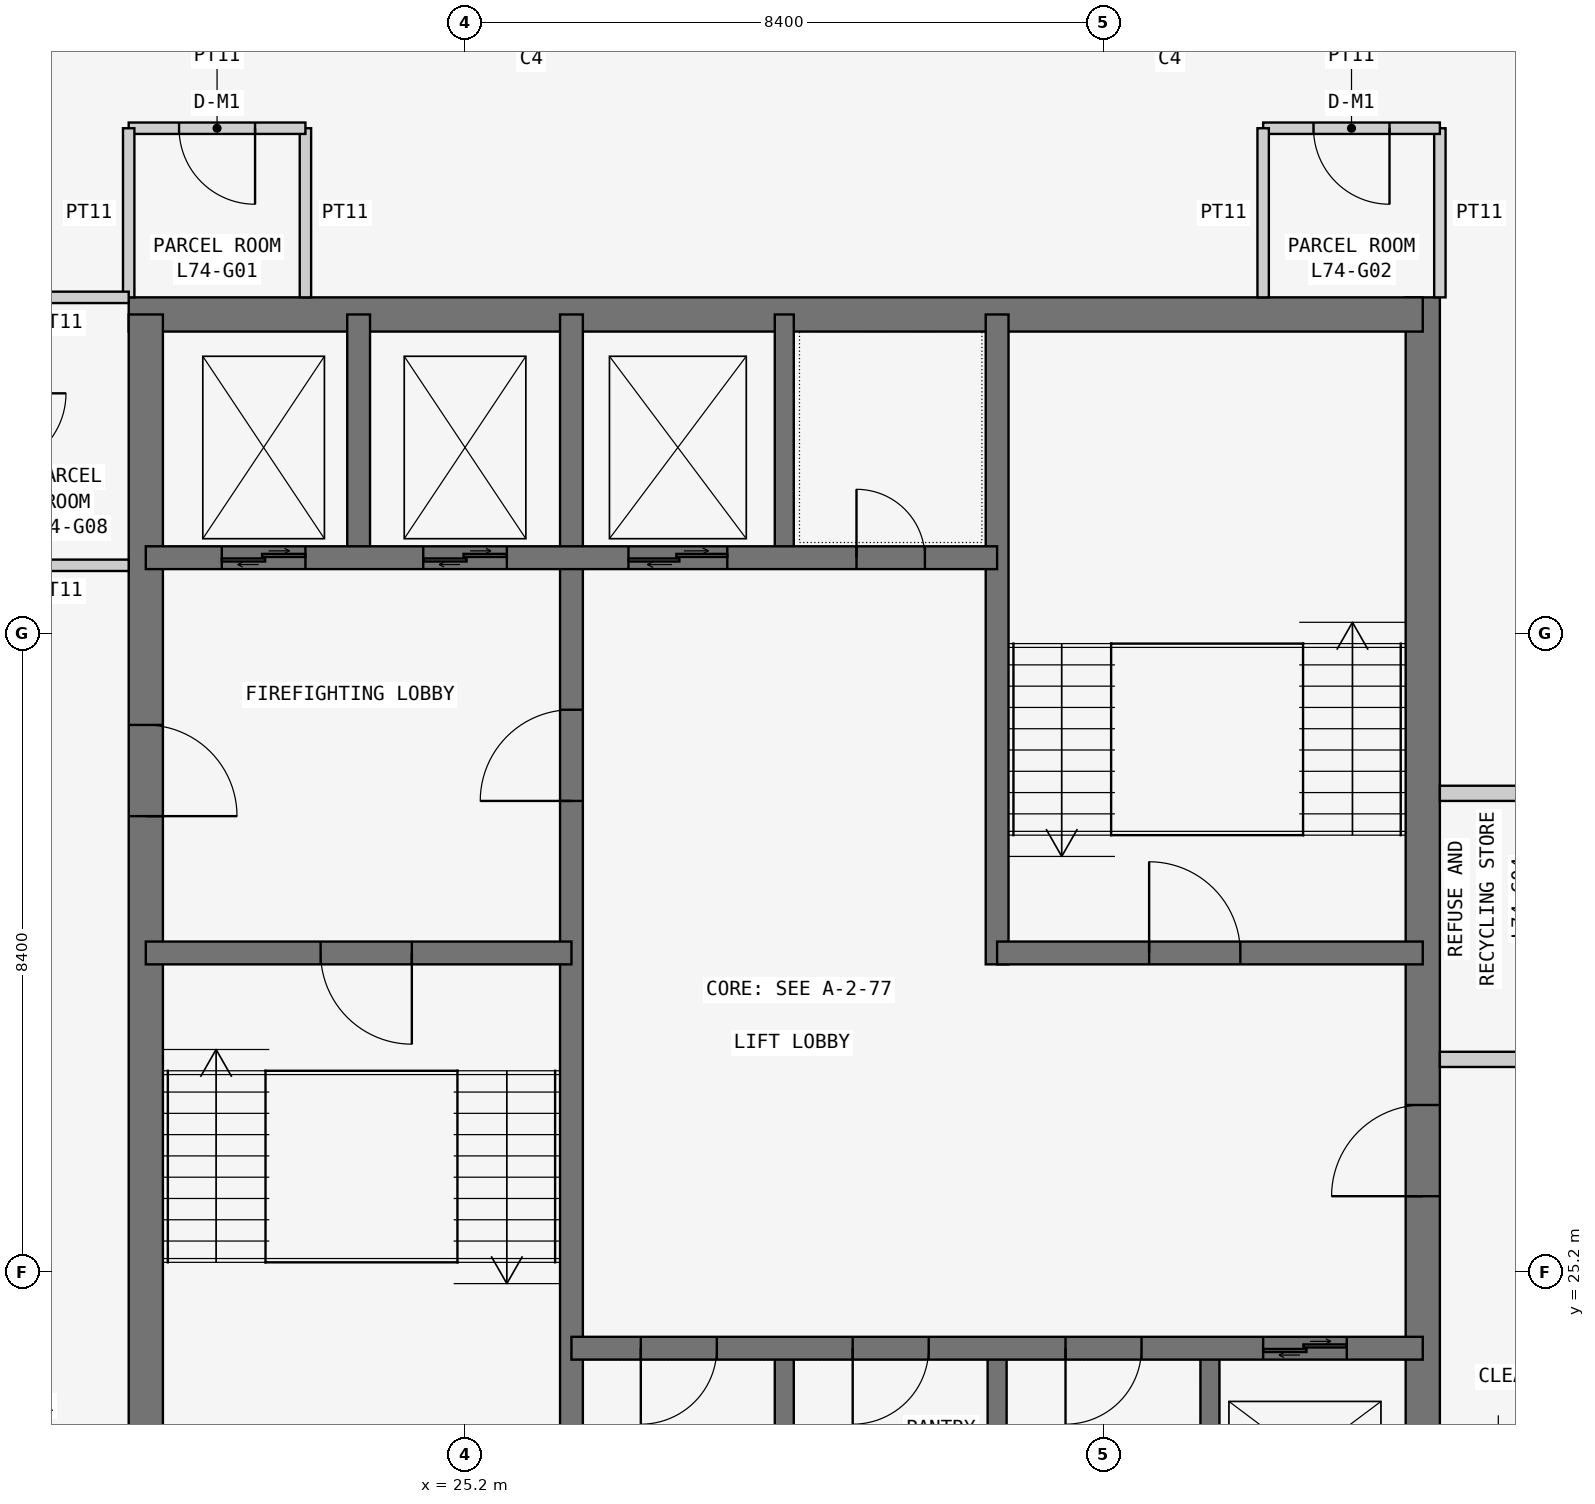
"""IFC4 building model, lengths in metres.
Left out: names, types, materials, properties, quantities, classifications, styles, units other than length and angle.
Written with IfcOpenShell. Run it as: python <this file> out.ifc"""

import sys

from ifc_helpers import new_model, si_unit, direction, frame, frame_2d, origin, place, context, subcontext, project, spatial, rectangle, extrude, element, fill, save


model = new_model("IFC4")
c1 = context("Model", 3, precision=1e-05, world=origin(), true_north=direction((0.0, 1.0)))
c2 = subcontext(c1, "Body", "Model", "MODEL_VIEW")
j1 = project(units=[si_unit("LENGTHUNIT", "METRE"), si_unit("PLANEANGLEUNIT", "RADIAN")], contexts=[c1])
p1 = place(None, origin())
s1 = spatial("IfcSite", under=j1, at=p1, CompositionType="ELEMENT")
p2 = place(p1, origin())
s2 = spatial("IfcBuilding", under=s1, at=p2, CompositionType="ELEMENT")
p3 = place(p2, frame((0.0, 0.0, 282.9)))
s3 = spatial("IfcBuildingStorey", under=s2, at=p3, CompositionType="ELEMENT", Elevation=282.9)
p4 = place(p3, frame((37.8, 21.0, 0.0), z_axis=(0.0, 0.0, 1.0), x_axis=(0.0, 1.0, 0.0)))
e1 = element("IfcWall", 1, at=p4, inside=s3, PredefinedType="SHEAR", context=c2, shape_type="SweptSolid", body=[
    extrude(rectangle(XDim=17.025, YDim=0.45, at=frame_2d((8.512, 0.0))), origin(), (0.0, 0.0, 1.0), 3.6),
])
p5 = place(p4, frame((5.2, 0.0, 0.0)))
e2 = element("IfcOpeningElement", 2, at=p5, cuts=e1, PredefinedType="OPENING", context=c2, shape_type="SweptSolid", body=[
    extrude(rectangle(XDim=1.2, YDim=2.1, at=frame_2d((0.6, 1.05))), frame((0.0, 0.235, 0.0), z_axis=(0.0, -1.0, 0.0), x_axis=(1.0, 0.0, 0.0)), (0.0, 0.0, 1.0), 0.47),
])
p6 = place(p3, frame((37.8, 37.8, 0.0), z_axis=(0.0, 0.0, 1.0), x_axis=(-1.0, 0.0, 0.0)))
e3 = element("IfcWall", 3, at=p6, inside=s3, PredefinedType="SHEAR", context=c2, shape_type="SweptSolid", body=[
    extrude(rectangle(XDim=17.025, YDim=0.45, at=frame_2d((8.513, 0.0))), origin(), (0.0, 0.0, 1.0), 3.6),
])
p7 = place(p3, frame((21.0, 37.8, 0.0), z_axis=(0.0, 0.0, 1.0), x_axis=(0.0, -1.0, 0.0)))
e4 = element("IfcWall", 4, at=p7, inside=s3, PredefinedType="SHEAR", context=c2, shape_type="SweptSolid", body=[
    extrude(rectangle(XDim=17.025, YDim=0.45, at=frame_2d((8.513, 0.0))), origin(), (0.0, 0.0, 1.0), 3.6),
])
p8 = place(p7, frame((5.4, 0.0, 0.0)))
e5 = element("IfcOpeningElement", 5, at=p8, cuts=e4, PredefinedType="OPENING", context=c2, shape_type="SweptSolid", body=[
    extrude(rectangle(XDim=1.2, YDim=2.1, at=frame_2d((0.6, 1.05))), frame((0.0, 0.235, 0.0), z_axis=(0.0, -1.0, 0.0), x_axis=(1.0, 0.0, 0.0)), (0.0, 0.0, 1.0), 0.47),
])
p9 = place(p3, frame((26.6, 21.0, 0.0), z_axis=(0.0, 0.0, 1.0), x_axis=(0.0, 1.0, 0.0)))
e6 = element("IfcWall", 6, at=p9, inside=s3, PredefinedType="SHEAR", context=c2, shape_type="SweptSolid", body=[
    extrude(rectangle(XDim=16.8, YDim=0.3, at=frame_2d((8.4, 0.0))), origin(), (0.0, 0.0, 1.0), 3.6),
])
p10 = place(p9, frame((10.4, 0.0, 0.0)))
e7 = element("IfcOpeningElement", 7, at=p10, cuts=e6, PredefinedType="OPENING", context=c2, shape_type="SweptSolid", body=[
    extrude(rectangle(XDim=1.2, YDim=2.1, at=frame_2d((0.6, 1.05))), frame((0.0, 0.16, 0.0), z_axis=(0.0, -1.0, 0.0), x_axis=(1.0, 0.0, 0.0)), (0.0, 0.0, 1.0), 0.32),
])
p11 = place(p3, frame((21.0, 29.4, 0.0), z_axis=(0.0, 0.0, 1.0), x_axis=(1.0, 0.0, 0.0)))
e8 = element("IfcWall", 8, at=p11, inside=s3, PredefinedType="SHEAR", context=c2, shape_type="SweptSolid", body=[
    extrude(rectangle(XDim=5.6, YDim=0.3, at=frame_2d((2.8, 0.0))), origin(), (0.0, 0.0, 1.0), 3.6),
])
p12 = place(p11, frame((2.3, 0.0, 0.0)))
e9 = element("IfcOpeningElement", 9, at=p12, cuts=e8, PredefinedType="OPENING", context=c2, shape_type="SweptSolid", body=[
    extrude(rectangle(XDim=1.2, YDim=2.1, at=frame_2d((0.6, 1.05))), frame((0.0, 0.16, 0.0), z_axis=(0.0, -1.0, 0.0), x_axis=(1.0, 0.0, 0.0)), (0.0, 0.0, 1.0), 0.32),
])
p13 = place(p3, frame((21.0, 34.6, 0.0), z_axis=(0.0, 0.0, 1.0), x_axis=(1.0, 0.0, 0.0)))
e10 = element("IfcWall", 10, at=p13, inside=s3, PredefinedType="SHEAR", context=c2, shape_type="SweptSolid", body=[
    extrude(rectangle(XDim=11.2, YDim=0.3, at=frame_2d((5.6, 0.0))), origin(), (0.0, 0.0, 1.0), 3.6),
])
p14 = place(p13, frame((9.35, 0.0, 0.0)))
e11 = element("IfcOpeningElement", 11, at=p14, cuts=e10, PredefinedType="OPENING", context=c2, shape_type="SweptSolid", body=[
    extrude(rectangle(XDim=0.9, YDim=2.1, at=frame_2d((0.45, 1.05))), frame((0.0, 0.16, 0.0), z_axis=(0.0, -1.0, 0.0), x_axis=(1.0, 0.0, 0.0)), (0.0, 0.0, 1.0), 0.32),
])
p15 = place(p13, frame((1.0, 0.0, 0.0)))
e12 = element("IfcOpeningElement", 12, at=p15, cuts=e10, PredefinedType="OPENING", context=c2, shape_type="SweptSolid", body=[
    extrude(rectangle(XDim=1.1, YDim=2.1, at=frame_2d((0.55, 1.05))), frame((0.0, 0.16, 0.0), z_axis=(0.0, -1.0, 0.0), x_axis=(1.0, 0.0, 0.0)), (0.0, 0.0, 1.0), 0.32),
])
p16 = place(p13, frame((3.65, 0.0, 0.0)))
e13 = element("IfcOpeningElement", 13, at=p16, cuts=e10, PredefinedType="OPENING", context=c2, shape_type="SweptSolid", body=[
    extrude(rectangle(XDim=1.1, YDim=2.1, at=frame_2d((0.55, 1.05))), frame((0.0, 0.16, 0.0), z_axis=(0.0, -1.0, 0.0), x_axis=(1.0, 0.0, 0.0)), (0.0, 0.0, 1.0), 0.32),
])
p17 = place(p13, frame((6.35, 0.0, 0.0)))
e14 = element("IfcOpeningElement", 14, at=p17, cuts=e10, PredefinedType="OPENING", context=c2, shape_type="SweptSolid", body=[
    extrude(rectangle(XDim=1.3, YDim=2.1, at=frame_2d((0.65, 1.05))), frame((0.0, 0.16, 0.0), z_axis=(0.0, -1.0, 0.0), x_axis=(1.0, 0.0, 0.0)), (0.0, 0.0, 1.0), 0.32),
])
p18 = place(p3, frame((23.8, 34.6, 0.0), z_axis=(0.0, 0.0, 1.0), x_axis=(0.0, 1.0, 0.0)))
e15 = element("IfcWall", 15, at=p18, inside=s3, PredefinedType="SHEAR", context=c2, shape_type="SweptSolid", body=[
    extrude(rectangle(XDim=3.2, YDim=0.3, at=frame_2d((1.6, 0.0))), origin(), (0.0, 0.0, 1.0), 3.6),
])
p19 = place(p3, frame((26.6, 24.2, 0.0), z_axis=(0.0, 0.0, 1.0), x_axis=(1.0, 0.0, 0.0)))
e16 = element("IfcWall", 16, at=p19, inside=s3, PredefinedType="SHEAR", context=c2, shape_type="SweptSolid", body=[
    extrude(rectangle(XDim=11.2, YDim=0.3, at=frame_2d((5.6, 0.0))), origin(), (0.0, 0.0, 1.0), 3.6),
])
p20 = place(p19, frame((0.913, 0.0, 0.0)))
e17 = element("IfcOpeningElement", 17, at=p20, cuts=e16, PredefinedType="OPENING", context=c2, shape_type="SweptSolid", body=[
    extrude(rectangle(XDim=1.0, YDim=2.1, at=frame_2d((0.5, 1.05))), frame((0.0, 0.16, 0.0), z_axis=(0.0, -1.0, 0.0), x_axis=(1.0, 0.0, 0.0)), (0.0, 0.0, 1.0), 0.32),
])
p21 = place(p19, frame((3.7, 0.0, 0.0)))
e18 = element("IfcOpeningElement", 18, at=p21, cuts=e16, PredefinedType="OPENING", context=c2, shape_type="SweptSolid", body=[
    extrude(rectangle(XDim=1.0, YDim=2.1, at=frame_2d((0.5, 1.05))), frame((0.0, 0.16, 0.0), z_axis=(0.0, -1.0, 0.0), x_axis=(1.0, 0.0, 0.0)), (0.0, 0.0, 1.0), 0.32),
])
p22 = place(p19, frame((6.5, 0.0, 0.0)))
e19 = element("IfcOpeningElement", 19, at=p22, cuts=e16, PredefinedType="OPENING", context=c2, shape_type="SweptSolid", body=[
    extrude(rectangle(XDim=1.0, YDim=2.1, at=frame_2d((0.5, 1.05))), frame((0.0, 0.16, 0.0), z_axis=(0.0, -1.0, 0.0), x_axis=(1.0, 0.0, 0.0)), (0.0, 0.0, 1.0), 0.32),
])
p23 = place(p19, frame((9.1, 0.0, 0.0)))
e20 = element("IfcOpeningElement", 20, at=p23, cuts=e16, PredefinedType="OPENING", context=c2, shape_type="SweptSolid", body=[
    extrude(rectangle(XDim=1.1, YDim=2.1, at=frame_2d((0.55, 1.05))), frame((0.0, 0.16, 0.0), z_axis=(0.0, -1.0, 0.0), x_axis=(1.0, 0.0, 0.0)), (0.0, 0.0, 1.0), 0.32),
])
p24 = place(p3, frame((32.2, 29.25, 0.0), z_axis=(0.0, 0.0, 1.0), x_axis=(0.0, 1.0, 0.0)))
e21 = element("IfcWall", 21, at=p24, inside=s3, PredefinedType="SHEAR", context=c2, shape_type="SweptSolid", body=[
    extrude(rectangle(XDim=8.55, YDim=0.3, at=frame_2d((4.275, 0.0))), origin(), (0.0, 0.0, 1.0), 3.6),
])
p25 = place(p3, frame((32.2, 29.4, 0.0), z_axis=(0.0, 0.0, 1.0), x_axis=(1.0, 0.0, 0.0)))
e22 = element("IfcWall", 22, at=p25, inside=s3, PredefinedType="SHEAR", context=c2, shape_type="SweptSolid", body=[
    extrude(rectangle(XDim=5.6, YDim=0.3, at=frame_2d((2.8, 0.0))), origin(), (0.0, 0.0, 1.0), 3.6),
])
p26 = place(p25, frame((2.0, 0.0, 0.0)))
e23 = element("IfcOpeningElement", 23, at=p26, cuts=e22, PredefinedType="OPENING", context=c2, shape_type="SweptSolid", body=[
    extrude(rectangle(XDim=1.2, YDim=2.1, at=frame_2d((0.6, 1.05))), frame((0.0, 0.16, 0.0), z_axis=(0.0, -1.0, 0.0), x_axis=(1.0, 0.0, 0.0)), (0.0, 0.0, 1.0), 0.32),
])
for number, where, z_axis, x_axis in (
    (24, (29.4, 21.0, 0.0), (0.0, 0.0, 1.0), (0.0, 1.0, 0.0)),
    (25, (32.2, 21.0, 0.0), (0.0, 0.0, 1.0), (0.0, 1.0, 0.0)),
    (26, (35.0, 21.0, 0.0), (0.0, 0.0, 1.0), (0.0, 1.0, 0.0)),
    (27, (29.4, 34.6, 0.0), (0.0, 0.0, 1.0), (0.0, 1.0, 0.0)),
):
    element("IfcWall", number, at=place(p3, frame(where, z_axis=z_axis, x_axis=x_axis)), inside=s3, PredefinedType="SHEAR", context=c2, shape_type="SweptSolid", body=[
        extrude(rectangle(XDim=3.2, YDim=0.25, at=frame_2d((1.6, 0.0))), origin(), (0.0, 0.0, 1.0), 3.6),
    ])
p27 = place(p3, frame((23.1, 38.025, 0.0), z_axis=(0.0, 0.0, 1.0), x_axis=(0.0, 1.0, 0.0)))
e28 = element("IfcWall", 28, at=p27, inside=s3, PredefinedType="PARTITIONING", context=c2, shape_type="SweptSolid", body=[
    extrude(rectangle(XDim=2.225, YDim=0.15, at=frame_2d((1.113, 0.0))), origin(), (0.0, 0.0, 1.0), 3.45),
])
p28 = place(p3, frame((23.1, 40.25, 0.0), z_axis=(0.0, 0.0, 1.0), x_axis=(-1.0, 0.0, 0.0)))
e29 = element("IfcWall", 29, at=p28, inside=s3, PredefinedType="PARTITIONING", context=c2, shape_type="SweptSolid", body=[
    extrude(rectangle(XDim=2.325, YDim=0.15, at=frame_2d((1.163, 0.0))), origin(), (0.0, 0.0, 1.0), 3.45),
])
p29 = place(p28, frame((0.663, 0.0, 0.0)))
e30 = element("IfcOpeningElement", 30, at=p29, cuts=e29, PredefinedType="OPENING", context=c2, shape_type="SweptSolid", body=[
    extrude(rectangle(XDim=1.0, YDim=2.1, at=frame_2d((0.5, 1.05))), frame((0.0, 0.085, 0.0), z_axis=(0.0, -1.0, 0.0), x_axis=(1.0, 0.0, 0.0)), (0.0, 0.0, 1.0), 0.17),
])
for number, where, z_axis, x_axis in (
    (31, (20.775, 40.25, 0.0), (0.0, 0.0, 1.0), (0.0, -1.0, 0.0)),
    (32, (38.025, 38.025, 0.0), (0.0, 0.0, 1.0), (0.0, 1.0, 0.0)),
):
    element("IfcWall", number, at=place(p3, frame(where, z_axis=z_axis, x_axis=x_axis)), inside=s3, PredefinedType="PARTITIONING", context=c2, shape_type="SweptSolid", body=[
        extrude(rectangle(XDim=2.225, YDim=0.15, at=frame_2d((1.113, 0.0))), origin(), (0.0, 0.0, 1.0), 3.45),
    ])
p30 = place(p3, frame((38.025, 40.25, 0.0), z_axis=(0.0, 0.0, 1.0), x_axis=(-1.0, 0.0, 0.0)))
e33 = element("IfcWall", 33, at=p30, inside=s3, PredefinedType="PARTITIONING", context=c2, shape_type="SweptSolid", body=[
    extrude(rectangle(XDim=2.325, YDim=0.15, at=frame_2d((1.163, 0.0))), origin(), (0.0, 0.0, 1.0), 3.45),
])
p31 = place(p30, frame((0.663, 0.0, 0.0)))
e34 = element("IfcOpeningElement", 34, at=p31, cuts=e33, PredefinedType="OPENING", context=c2, shape_type="SweptSolid", body=[
    extrude(rectangle(XDim=1.0, YDim=2.1, at=frame_2d((0.5, 1.05))), frame((0.0, 0.085, 0.0), z_axis=(0.0, -1.0, 0.0), x_axis=(1.0, 0.0, 0.0)), (0.0, 0.0, 1.0), 0.17),
])
p32 = place(p3, frame((35.7, 40.25, 0.0), z_axis=(0.0, 0.0, 1.0), x_axis=(0.0, -1.0, 0.0)))
e35 = element("IfcWall", 35, at=p32, inside=s3, PredefinedType="PARTITIONING", context=c2, shape_type="SweptSolid", body=[
    extrude(rectangle(XDim=2.225, YDim=0.15, at=frame_2d((1.113, 0.0))), origin(), (0.0, 0.0, 1.0), 3.45),
])
for number, where, z_axis, x_axis in (
    (36, (38.025, 28.0, 0.0), (0.0, 0.0, 1.0), (1.0, 0.0, 0.0)),
    (37, (40.6, 31.5, 0.0), (0.0, 0.0, 1.0), (-1.0, 0.0, 0.0)),
):
    element("IfcWall", number, at=place(p3, frame(where, z_axis=z_axis, x_axis=x_axis)), inside=s3, PredefinedType="PARTITIONING", context=c2, shape_type="SweptSolid", body=[
        extrude(rectangle(XDim=2.575, YDim=0.2, at=frame_2d((1.288, 0.0))), origin(), (0.0, 0.0, 1.0), 3.45),
    ])
for number, where, z_axis, x_axis in (
    (38, (20.775, 38.025, 0.0), (0.0, 0.0, 1.0), (-1.0, 0.0, 0.0)),
    (39, (18.95, 34.5, 0.0), (0.0, 0.0, 1.0), (1.0, 0.0, 0.0)),
):
    element("IfcWall", number, at=place(p3, frame(where, z_axis=z_axis, x_axis=x_axis)), inside=s3, PredefinedType="PARTITIONING", context=c2, shape_type="SweptSolid", body=[
        extrude(rectangle(XDim=1.825, YDim=0.15, at=frame_2d((0.913, 0.0))), origin(), (0.0, 0.0, 1.0), 3.45),
    ])
p33 = place(p29, origin())
e40 = element("IfcDoor", 40, at=p33, inside=s3, OperationType="SINGLE_SWING_LEFT", PredefinedType="DOOR", context=c2, shape_type="SweptSolid", body=[
    extrude(rectangle(XDim=1.0, YDim=2.1, at=frame_2d((0.5, 1.05))), frame((0.0, 0.025, 0.0), z_axis=(0.0, -1.0, 0.0), x_axis=(1.0, 0.0, 0.0)), (0.0, 0.0, 1.0), 0.05),
])
fill(e30, e40)
p34 = place(p31, origin())
e41 = element("IfcDoor", 41, at=p34, inside=s3, OperationType="SINGLE_SWING_LEFT", PredefinedType="DOOR", context=c2, shape_type="SweptSolid", body=[
    extrude(rectangle(XDim=1.0, YDim=2.1, at=frame_2d((0.5, 1.05))), frame((0.0, 0.025, 0.0), z_axis=(0.0, -1.0, 0.0), x_axis=(1.0, 0.0, 0.0)), (0.0, 0.0, 1.0), 0.05),
])
fill(e34, e41)
p35 = place(p8, origin())
e42 = element("IfcDoor", 42, at=p35, inside=s3, OperationType="SINGLE_SWING_RIGHT", PredefinedType="DOOR", context=c2, shape_type="SweptSolid", body=[
    extrude(rectangle(XDim=1.2, YDim=2.1, at=frame_2d((0.6, 1.05))), frame((0.0, 0.025, 0.0), z_axis=(0.0, -1.0, 0.0), x_axis=(1.0, 0.0, 0.0)), (0.0, 0.0, 1.0), 0.05),
])
fill(e5, e42)
p36 = place(p12, frame((1.2, 0.0, 0.0), z_axis=(0.0, 0.0, 1.0), x_axis=(-1.0, 0.0, 0.0)))
e43 = element("IfcDoor", 43, at=p36, inside=s3, OperationType="SINGLE_SWING_LEFT", PredefinedType="DOOR", context=c2, shape_type="SweptSolid", body=[
    extrude(rectangle(XDim=1.2, YDim=2.1, at=frame_2d((0.6, 1.05))), frame((0.0, 0.025, 0.0), z_axis=(0.0, -1.0, 0.0), x_axis=(1.0, 0.0, 0.0)), (0.0, 0.0, 1.0), 0.05),
])
fill(e9, e43)
p37 = place(p10, origin())
e44 = element("IfcDoor", 44, at=p37, inside=s3, OperationType="SINGLE_SWING_LEFT", PredefinedType="DOOR", context=c2, shape_type="SweptSolid", body=[
    extrude(rectangle(XDim=1.2, YDim=2.1, at=frame_2d((0.6, 1.05))), frame((0.0, 0.025, 0.0), z_axis=(0.0, -1.0, 0.0), x_axis=(1.0, 0.0, 0.0)), (0.0, 0.0, 1.0), 0.05),
])
fill(e7, e44)
p38 = place(p5, origin())
e45 = element("IfcDoor", 45, at=p38, inside=s3, OperationType="SINGLE_SWING_LEFT", PredefinedType="DOOR", context=c2, shape_type="SweptSolid", body=[
    extrude(rectangle(XDim=1.2, YDim=2.1, at=frame_2d((0.6, 1.05))), frame((0.0, 0.025, 0.0), z_axis=(0.0, -1.0, 0.0), x_axis=(1.0, 0.0, 0.0)), (0.0, 0.0, 1.0), 0.05),
])
fill(e2, e45)
p39 = place(p26, origin())
e46 = element("IfcDoor", 46, at=p39, inside=s3, OperationType="SINGLE_SWING_LEFT", PredefinedType="DOOR", context=c2, shape_type="SweptSolid", body=[
    extrude(rectangle(XDim=1.2, YDim=2.1, at=frame_2d((0.6, 1.05))), frame((0.0, 0.025, 0.0), z_axis=(0.0, -1.0, 0.0), x_axis=(1.0, 0.0, 0.0)), (0.0, 0.0, 1.0), 0.05),
])
fill(e23, e46)
p40 = place(p14, origin())
e47 = element("IfcDoor", 47, at=p40, inside=s3, OperationType="SINGLE_SWING_LEFT", PredefinedType="DOOR", context=c2, shape_type="SweptSolid", body=[
    extrude(rectangle(XDim=0.9, YDim=2.1, at=frame_2d((0.45, 1.05))), frame((0.0, 0.025, 0.0), z_axis=(0.0, -1.0, 0.0), x_axis=(1.0, 0.0, 0.0)), (0.0, 0.0, 1.0), 0.05),
])
fill(e11, e47)
p41 = place(p20, frame((1.0, 0.0, 0.0), z_axis=(0.0, 0.0, 1.0), x_axis=(-1.0, 0.0, 0.0)))
e48 = element("IfcDoor", 48, at=p41, inside=s3, OperationType="SINGLE_SWING_RIGHT", PredefinedType="DOOR", context=c2, shape_type="SweptSolid", body=[
    extrude(rectangle(XDim=1.0, YDim=2.1, at=frame_2d((0.5, 1.05))), frame((0.0, 0.025, 0.0), z_axis=(0.0, -1.0, 0.0), x_axis=(1.0, 0.0, 0.0)), (0.0, 0.0, 1.0), 0.05),
])
fill(e17, e48)
p42 = place(p21, frame((1.0, 0.0, 0.0), z_axis=(0.0, 0.0, 1.0), x_axis=(-1.0, 0.0, 0.0)))
e49 = element("IfcDoor", 49, at=p42, inside=s3, OperationType="SINGLE_SWING_RIGHT", PredefinedType="DOOR", context=c2, shape_type="SweptSolid", body=[
    extrude(rectangle(XDim=1.0, YDim=2.1, at=frame_2d((0.5, 1.05))), frame((0.0, 0.025, 0.0), z_axis=(0.0, -1.0, 0.0), x_axis=(1.0, 0.0, 0.0)), (0.0, 0.0, 1.0), 0.05),
])
fill(e18, e49)
p43 = place(p22, frame((1.0, 0.0, 0.0), z_axis=(0.0, 0.0, 1.0), x_axis=(-1.0, 0.0, 0.0)))
e50 = element("IfcDoor", 50, at=p43, inside=s3, OperationType="SINGLE_SWING_RIGHT", PredefinedType="DOOR", context=c2, shape_type="SweptSolid", body=[
    extrude(rectangle(XDim=1.0, YDim=2.1, at=frame_2d((0.5, 1.05))), frame((0.0, 0.025, 0.0), z_axis=(0.0, -1.0, 0.0), x_axis=(1.0, 0.0, 0.0)), (0.0, 0.0, 1.0), 0.05),
])
fill(e19, e50)
p44 = place(p23, origin())
e51 = element("IfcDoor", 51, at=p44, inside=s3, OperationType="DOUBLE_DOOR_SLIDING", PredefinedType="DOOR", context=c2, shape_type="SweptSolid", body=[
    extrude(rectangle(XDim=1.1, YDim=2.1, at=frame_2d((0.55, 1.05))), frame((0.0, 0.025, 0.0), z_axis=(0.0, -1.0, 0.0), x_axis=(1.0, 0.0, 0.0)), (0.0, 0.0, 1.0), 0.05),
])
fill(e20, e51)
p45 = place(p15, origin())
e52 = element("IfcDoor", 52, at=p45, inside=s3, OperationType="DOUBLE_DOOR_SLIDING", PredefinedType="DOOR", context=c2, shape_type="SweptSolid", body=[
    extrude(rectangle(XDim=1.1, YDim=2.1, at=frame_2d((0.55, 1.05))), frame((0.0, 0.025, 0.0), z_axis=(0.0, -1.0, 0.0), x_axis=(1.0, 0.0, 0.0)), (0.0, 0.0, 1.0), 0.05),
])
fill(e12, e52)
p46 = place(p16, origin())
e53 = element("IfcDoor", 53, at=p46, inside=s3, OperationType="DOUBLE_DOOR_SLIDING", PredefinedType="DOOR", context=c2, shape_type="SweptSolid", body=[
    extrude(rectangle(XDim=1.1, YDim=2.1, at=frame_2d((0.55, 1.05))), frame((0.0, 0.025, 0.0), z_axis=(0.0, -1.0, 0.0), x_axis=(1.0, 0.0, 0.0)), (0.0, 0.0, 1.0), 0.05),
])
fill(e13, e53)
p47 = place(p17, origin())
e54 = element("IfcDoor", 54, at=p47, inside=s3, OperationType="DOUBLE_DOOR_SLIDING", PredefinedType="DOOR", context=c2, shape_type="SweptSolid", body=[
    extrude(rectangle(XDim=1.3, YDim=2.1, at=frame_2d((0.65, 1.05))), frame((0.0, 0.025, 0.0), z_axis=(0.0, -1.0, 0.0), x_axis=(1.0, 0.0, 0.0)), (0.0, 0.0, 1.0), 0.05),
])
fill(e14, e54)
save(model, sys.argv[1])
